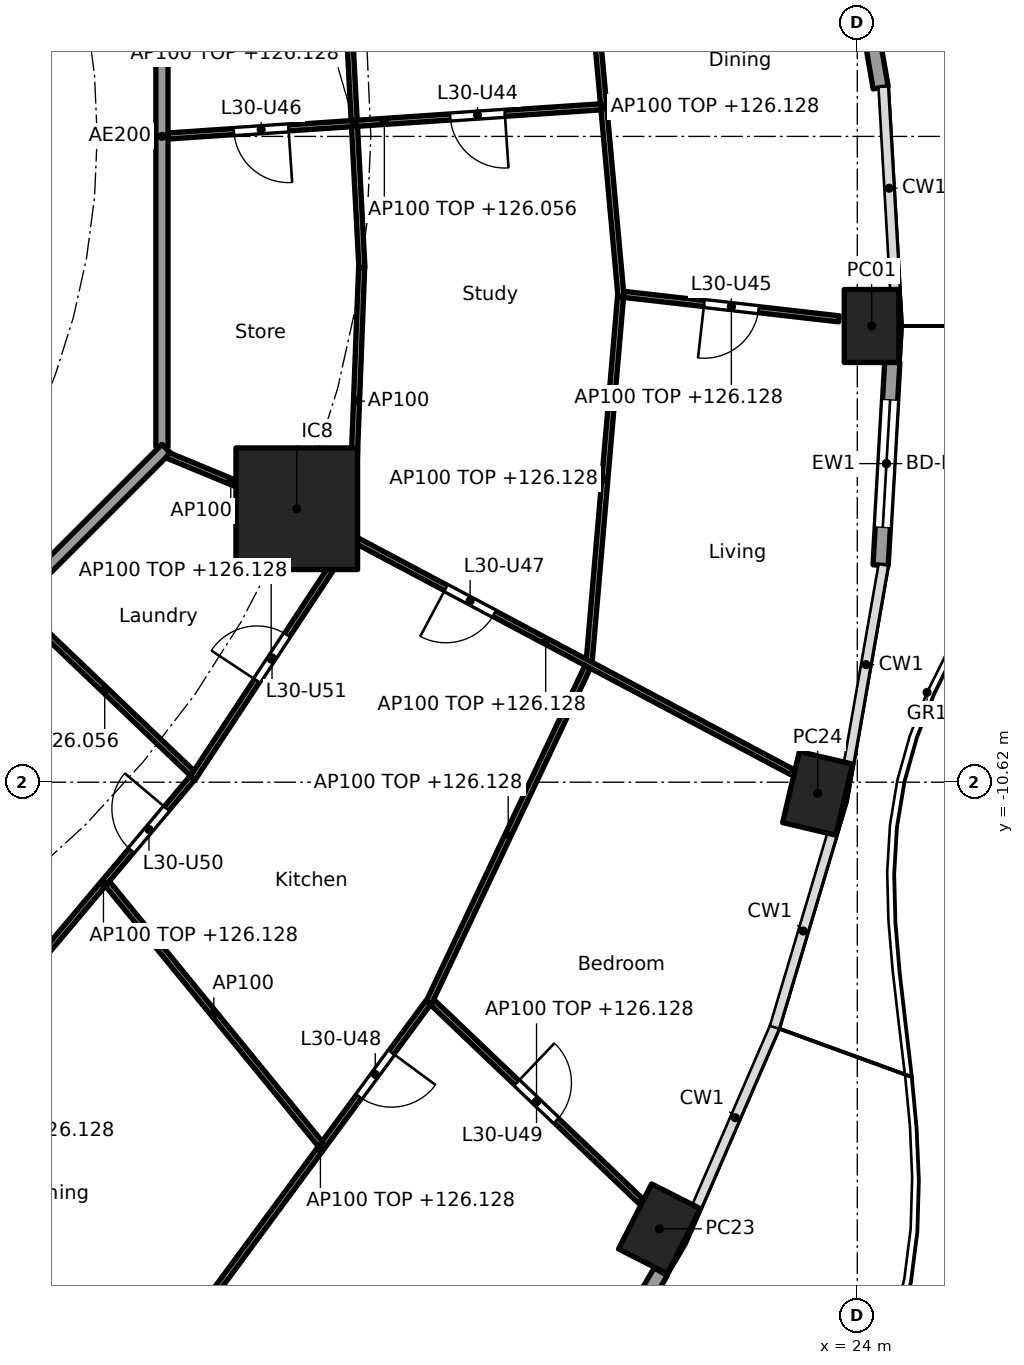
"""IFC4 building model, lengths in metres.
Left out: names, types, materials, properties, quantities, classifications, styles, units other than length and angle.
Written with IfcOpenShell. Run it as: python <this file> out.ifc"""

import sys

from ifc_helpers import new_model, si_unit, direction, frame, frame_2d, origin, origin_2d, place, context, subcontext, project, spatial, rectangle, hollow_rectangle, extrude, element, fill, save


model = new_model("IFC4")
c1 = context("Model", 3, precision=1e-05, world=origin(), true_north=direction((0.0, 1.0)))
c2 = subcontext(c1, "Body", "Model", "MODEL_VIEW")
j1 = project(units=[si_unit("LENGTHUNIT", "METRE"), si_unit("PLANEANGLEUNIT", "RADIAN")], contexts=[c1])
p1 = place(None, origin())
s1 = spatial("IfcSite", under=j1, at=p1, CompositionType="ELEMENT")
p2 = place(p1, origin())
s2 = spatial("IfcBuilding", under=s1, at=p2, CompositionType="ELEMENT")
p3 = place(p2, frame((0.0, 0.0, 123.3)))
s3 = spatial("IfcBuildingStorey", under=s2, at=p3, CompositionType="ELEMENT", Elevation=123.3)
for number, where, z_axis, x_axis in (
    (1, (24.235, -3.118, 0.0), (0.0, 0.0, 1.0), (0.0, 1.0, 0.0)),
    (2, (20.747, -17.965, 0.0), (0.0, 0.0, 1.0), (0.452, 0.892, 0.0)),
    (3, (23.348, -10.803, 0.0), (0.0, 0.0, 1.0), (0.229, 0.973, 0.0)),
):
    element("IfcColumn", number, at=place(p3, frame(where, z_axis=z_axis, x_axis=x_axis)), inside=s3, PredefinedType="COLUMN", context=c2, shape_type="SweptSolid", body=[
        extrude(hollow_rectangle(XDim=1.2, YDim=0.9, WallThickness=0.04, at=origin_2d()), origin(), (0.0, 0.0, 1.0), 3.7),
    ])
p4 = place(p3, frame((14.782, -6.123, 0.0), z_axis=(0.0, 0.0, 1.0), x_axis=(1.0, 0.0, 0.0)))
e4 = element("IfcColumn", 4, at=p4, inside=s3, PredefinedType="COLUMN", context=c2, shape_type="SweptSolid", body=[
    extrude(rectangle(XDim=2.0, YDim=2.0, at=origin_2d()), origin(), (0.0, 0.0, 1.0), 3.7),
])
p5 = place(p3, frame((23.811, 4.085, 0.0), z_axis=(0.0, 0.0, 1.0), x_axis=(0.172163521006, -0.985068384446, 0.0)))
e5 = element("IfcWall", 5, at=p5, inside=s3, PredefinedType="SOLIDWALL", context=c2, shape_type="SweptSolid", body=[
    extrude(rectangle(XDim=3.333, YDim=0.25, at=frame_2d((1.666, 0.0))), origin(), (0.0, 0.0, 1.0), 3.44),
])
p6 = place(p5, frame((0.616, 0.0, 0.0)))
e6 = element("IfcOpeningElement", 6, at=p6, cuts=e5, PredefinedType="OPENING", context=c2, shape_type="SweptSolid", body=[
    extrude(rectangle(XDim=2.1, YDim=2.4, at=frame_2d((1.05, 1.2))), frame((0.0, 0.135, 0.0), z_axis=(0.0, -1.0, 0.0), x_axis=(1.0, 0.0, 0.0)), (0.0, 0.0, 1.0), 0.27),
])
p7 = place(p3, frame((20.768, -18.669, 0.0), z_axis=(0.0, 0.0, 1.0), x_axis=(-0.506314982873, -0.862348617508, 0.0)))
e7 = element("IfcWall", 7, at=p7, inside=s3, PredefinedType="SOLIDWALL", context=c2, shape_type="SweptSolid", body=[
    extrude(rectangle(XDim=3.208, YDim=0.25, at=frame_2d((1.604, 0.0))), origin(), (0.0, 0.0, 1.0), 3.44),
])
p8 = place(p7, frame((0.554, 0.0, 0.0)))
e8 = element("IfcOpeningElement", 8, at=p8, cuts=e7, PredefinedType="OPENING", context=c2, shape_type="SweptSolid", body=[
    extrude(rectangle(XDim=2.1, YDim=2.4, at=frame_2d((1.05, 1.2))), frame((0.0, 0.135, 0.0), z_axis=(0.0, -1.0, 0.0), x_axis=(1.0, 0.0, 0.0)), (0.0, 0.0, 1.0), 0.27),
])
p9 = place(p3, frame((24.576, -3.709, 0.0), z_axis=(0.0, 0.0, 1.0), x_axis=(-0.05746514539, -0.998347513176, 0.0)))
e9 = element("IfcWall", 9, at=p9, inside=s3, PredefinedType="SOLIDWALL", context=c2, shape_type="SweptSolid", body=[
    extrude(rectangle(XDim=3.348, YDim=0.25, at=frame_2d((1.674, 0.0))), origin(), (0.0, 0.0, 1.0), 3.44),
])
p10 = place(p9, frame((0.624, 0.0, 0.0)))
e10 = element("IfcOpeningElement", 10, at=p10, cuts=e9, PredefinedType="OPENING", context=c2, shape_type="SweptSolid", body=[
    extrude(rectangle(XDim=2.1, YDim=2.4, at=frame_2d((1.05, 1.2))), frame((0.0, 0.135, 0.0), z_axis=(0.0, -1.0, 0.0), x_axis=(1.0, 0.0, 0.0)), (0.0, 0.0, 1.0), 0.27),
])
p11 = place(p3, frame((6.14, -14.829, 0.0), z_axis=(0.0, 0.0, 1.0), x_axis=(0.346169582481, -0.938171956608, 0.0)))
e11 = element("IfcWall", 11, at=p11, inside=s3, PredefinedType="PARTITIONING", context=c2, shape_type="SweptSolid", body=[
    extrude(rectangle(XDim=14.354, YDim=0.2, at=frame_2d((7.177, 0.0))), origin(), (0.0, 0.0, 1.0), 2.828),
])
p12 = place(p3, frame((12.565, -5.104, 0.0), z_axis=(0.0, 0.0, 1.0), x_axis=(0.0, 1.0, 0.0)))
e12 = element("IfcWall", 12, at=p12, inside=s3, PredefinedType="PARTITIONING", context=c2, shape_type="SweptSolid", body=[
    extrude(rectangle(XDim=10.209, YDim=0.2, at=frame_2d((5.104, 0.0))), origin(), (0.0, 0.0, 1.0), 3.44),
])
p13 = place(p3, frame((5.275, -12.494, 0.0), z_axis=(0.0, 0.0, 1.0), x_axis=(0.707106781187, 0.707106781187, 0.0)))
e13 = element("IfcWall", 13, at=p13, inside=s3, PredefinedType="PARTITIONING", context=c2, shape_type="SweptSolid", body=[
    extrude(rectangle(XDim=10.409, YDim=0.2, at=frame_2d((5.205, 0.0))), origin(), (0.0, 0.0, 1.0), 3.44),
])
p14 = place(p3, frame((15.853, -2.158, 0.0), z_axis=(0.0, 0.0, 1.0), x_axis=(-0.052483289253, 0.99862180246, 0.0)))
e14 = element("IfcWall", 14, at=p14, inside=s3, PredefinedType="PARTITIONING", context=c2, shape_type="SweptSolid", body=[
    extrude(rectangle(XDim=4.75, YDim=0.1, at=frame_2d((2.375, 0.0))), origin(), (0.0, 0.0, 1.0), 2.828),
])
p15 = place(p3, frame((15.849, -2.158, 0.0), z_axis=(0.0, 0.0, 1.0), x_axis=(-0.038390448414, -0.999262815014, 0.0)))
e15 = element("IfcWall", 15, at=p15, inside=s3, PredefinedType="PARTITIONING", context=c2, shape_type="SweptSolid", body=[
    extrude(rectangle(XDim=4.394, YDim=0.1, at=frame_2d((2.197, 0.0))), origin(), (0.0, 0.0, 1.0), 3.44),
])
p16 = place(p3, frame((20.16, -2.598, 0.0), z_axis=(0.0, 0.0, 1.0), x_axis=(0.993610673305, -0.112861994911, 0.0)))
e16 = element("IfcWall", 16, at=p16, inside=s3, PredefinedType="PARTITIONING", context=c2, shape_type="SweptSolid", body=[
    extrude(rectangle(XDim=3.561, YDim=0.1, at=frame_2d((1.78, 0.0))), origin(), (0.0, 0.0, 1.0), 2.828),
])
p17 = place(p16, frame((1.33, 0.0, 0.0)))
e17 = element("IfcOpeningElement", 17, at=p17, cuts=e16, PredefinedType="OPENING", context=c2, shape_type="SweptSolid", body=[
    extrude(rectangle(XDim=0.9, YDim=2.1, at=frame_2d((0.45, 1.05))), frame((0.0, 0.06, 0.0), z_axis=(0.0, -1.0, 0.0), x_axis=(1.0, 0.0, 0.0)), (0.0, 0.0, 1.0), 0.12),
])
p18 = place(p3, frame((20.115, -2.642, 0.0), z_axis=(0.0, 0.0, 1.0), x_axis=(-0.090563746294, 0.995890660593, 0.0)))
e18 = element("IfcWall", 18, at=p18, inside=s3, PredefinedType="PARTITIONING", context=c2, shape_type="SweptSolid", body=[
    extrude(rectangle(XDim=6.289, YDim=0.1, at=frame_2d((3.145, 0.0))), origin(), (0.0, 0.0, 1.0), 2.828),
])
p19 = place(p18, frame((4.242, 0.0, 0.0)))
e19 = element("IfcOpeningElement", 19, at=p19, cuts=e18, PredefinedType="OPENING", context=c2, shape_type="SweptSolid", body=[
    extrude(rectangle(XDim=0.9, YDim=2.1, at=frame_2d((0.45, 1.05))), frame((0.0, 0.06, 0.0), z_axis=(0.0, -1.0, 0.0), x_axis=(1.0, 0.0, 0.0)), (0.0, 0.0, 1.0), 0.12),
])
p20 = place(p3, frame((20.106, -2.642, 0.0), z_axis=(0.0, 0.0, 1.0), x_axis=(-0.085672025822, -0.996323393277, 0.0)))
e20 = element("IfcWall", 20, at=p20, inside=s3, PredefinedType="PARTITIONING", context=c2, shape_type="SweptSolid", body=[
    extrude(rectangle(XDim=6.007, YDim=0.1, at=frame_2d((3.003, 0.0))), origin(), (0.0, 0.0, 1.0), 2.828),
])
p21 = place(p3, frame((12.665, 0.007, 0.0), z_axis=(0.0, 0.0, 1.0), x_axis=(0.997737186236, 0.067234717233, 0.0)))
e21 = element("IfcWall", 21, at=p21, inside=s3, PredefinedType="PARTITIONING", context=c2, shape_type="SweptSolid", body=[
    extrude(rectangle(XDim=7.132, YDim=0.1, at=frame_2d((3.566, 0.0))), origin(), (0.0, 0.0, 1.0), 2.756),
])
p22 = place(p21, frame((4.651, 0.0, 0.0)))
e22 = element("IfcOpeningElement", 22, at=p22, cuts=e21, PredefinedType="OPENING", context=c2, shape_type="SweptSolid", body=[
    extrude(rectangle(XDim=0.9, YDim=2.1, at=frame_2d((0.45, 1.05))), frame((0.0, 0.06, 0.0), z_axis=(0.0, -1.0, 0.0), x_axis=(1.0, 0.0, 0.0)), (0.0, 0.0, 1.0), 0.12),
])
p23 = place(p21, frame((1.085, 0.0, 0.0)))
e23 = element("IfcOpeningElement", 23, at=p23, cuts=e21, PredefinedType="OPENING", context=c2, shape_type="SweptSolid", body=[
    extrude(rectangle(XDim=0.9, YDim=2.1, at=frame_2d((0.45, 1.05))), frame((0.0, 0.06, 0.0), z_axis=(0.0, -1.0, 0.0), x_axis=(1.0, 0.0, 0.0)), (0.0, 0.0, 1.0), 0.12),
])
p24 = place(p3, frame((10.138, -14.026, 0.0), z_axis=(0.0, 0.0, 1.0), x_axis=(0.644051444483, 0.764982180746, 0.0)))
e24 = element("IfcWall", 24, at=p24, inside=s3, PredefinedType="PARTITIONING", context=c2, shape_type="SweptSolid", body=[
    extrude(rectangle(XDim=4.548, YDim=0.1, at=frame_2d((2.274, 0.0))), origin(), (0.0, 0.0, 1.0), 2.828),
])
p25 = place(p24, frame((2.986, 0.0, 0.0)))
e25 = element("IfcOpeningElement", 25, at=p25, cuts=e24, PredefinedType="OPENING", context=c2, shape_type="SweptSolid", body=[
    extrude(rectangle(XDim=0.9, YDim=2.1, at=frame_2d((0.45, 1.05))), frame((0.0, 0.06, 0.0), z_axis=(0.0, -1.0, 0.0), x_axis=(1.0, 0.0, 0.0)), (0.0, 0.0, 1.0), 0.12),
])
p26 = place(p3, frame((13.397, -19.053, 0.0), z_axis=(0.0, 0.0, 1.0), x_axis=(0.593522299069, 0.804817544856, 0.0)))
e26 = element("IfcWall", 26, at=p26, inside=s3, PredefinedType="PARTITIONING", context=c2, shape_type="SweptSolid", body=[
    extrude(rectangle(XDim=5.976, YDim=0.1, at=frame_2d((2.988, 0.0))), origin(), (0.0, 0.0, 1.0), 2.828),
])
p27 = place(p26, frame((4.057, 0.0, 0.0)))
e27 = element("IfcOpeningElement", 27, at=p27, cuts=e26, PredefinedType="OPENING", context=c2, shape_type="SweptSolid", body=[
    extrude(rectangle(XDim=0.9, YDim=2.1, at=frame_2d((0.45, 1.05))), frame((0.0, 0.06, 0.0), z_axis=(0.0, -1.0, 0.0), x_axis=(1.0, 0.0, 0.0)), (0.0, 0.0, 1.0), 0.12),
])
p28 = place(p3, frame((11.667, -12.287, 0.0), z_axis=(0.0, 0.0, 1.0), x_axis=(0.633038312428, -0.774120465431, 0.0)))
e28 = element("IfcWall", 28, at=p28, inside=s3, PredefinedType="PARTITIONING", context=c2, shape_type="SweptSolid", body=[
    extrude(rectangle(XDim=5.532, YDim=0.1, at=frame_2d((2.766, 0.0))), origin(), (0.0, 0.0, 1.0), 3.44),
])
p29 = place(p3, frame((10.184, -7.727, 0.0), z_axis=(0.0, 0.0, 1.0), x_axis=(0.723654892782, -0.690162007179, 0.0)))
e29 = element("IfcWall", 29, at=p29, inside=s3, PredefinedType="PARTITIONING", context=c2, shape_type="SweptSolid", body=[
    extrude(rectangle(XDim=3.98, YDim=0.1, at=frame_2d((1.99, 0.0))), origin(), (0.0, 0.0, 1.0), 2.756),
])
p30 = place(p3, frame((13.072, -10.55, 0.0), z_axis=(0.0, 0.0, 1.0), x_axis=(0.550614843759, 0.834759422727, 0.0)))
e30 = element("IfcWall", 30, at=p30, inside=s3, PredefinedType="PARTITIONING", context=c2, shape_type="SweptSolid", body=[
    extrude(rectangle(XDim=4.683, YDim=0.1, at=frame_2d((2.341, 0.0))), origin(), (0.0, 0.0, 1.0), 2.828),
])
p31 = place(p30, frame((1.917, 0.0, 0.0)))
e31 = element("IfcOpeningElement", 31, at=p31, cuts=e30, PredefinedType="OPENING", context=c2, shape_type="SweptSolid", body=[
    extrude(rectangle(XDim=0.9, YDim=2.1, at=frame_2d((0.45, 1.05))), frame((0.0, 0.06, 0.0), z_axis=(0.0, -1.0, 0.0), x_axis=(1.0, 0.0, 0.0)), (0.0, 0.0, 1.0), 0.12),
])
p32 = place(p3, frame((17.01, -14.238, 0.0), z_axis=(0.0, 0.0, 1.0), x_axis=(0.723650186498, -0.690166941821, 0.0)))
e32 = element("IfcWall", 32, at=p32, inside=s3, PredefinedType="PARTITIONING", context=c2, shape_type="SweptSolid", body=[
    extrude(rectangle(XDim=4.74, YDim=0.1, at=frame_2d((2.37, 0.0))), origin(), (0.0, 0.0, 1.0), 2.828),
])
p33 = place(p32, frame((1.92, 0.0, 0.0)))
e33 = element("IfcOpeningElement", 33, at=p33, cuts=e32, PredefinedType="OPENING", context=c2, shape_type="SweptSolid", body=[
    extrude(rectangle(XDim=0.9, YDim=2.1, at=frame_2d((0.45, 1.05))), frame((0.0, 0.06, 0.0), z_axis=(0.0, -1.0, 0.0), x_axis=(1.0, 0.0, 0.0)), (0.0, 0.0, 1.0), 0.12),
])
p34 = place(p3, frame((16.953, -14.249, 0.0), z_axis=(0.0, 0.0, 1.0), x_axis=(0.427456178439, 0.904036069808, 0.0)))
e34 = element("IfcWall", 34, at=p34, inside=s3, PredefinedType="PARTITIONING", context=c2, shape_type="SweptSolid", body=[
    extrude(rectangle(XDim=6.113, YDim=0.1, at=frame_2d((3.057, 0.0))), origin(), (0.0, 0.0, 1.0), 2.828),
])
p35 = place(p3, frame((12.657, -5.243, 0.0), z_axis=(0.0, 0.0, 1.0), x_axis=(0.923864733477, -0.382719158442, 0.0)))
e35 = element("IfcWall", 35, at=p35, inside=s3, PredefinedType="PARTITIONING", context=c2, shape_type="SweptSolid", body=[
    extrude(rectangle(XDim=2.25, YDim=0.1, at=frame_2d((1.125, 0.0))), origin(), (0.0, 0.0, 1.0), 3.44),
])
p36 = place(p3, frame((14.826, -6.146, 0.0), z_axis=(0.0, 0.0, 1.0), x_axis=(0.883012998471, -0.469348532044, 0.0)))
e36 = element("IfcWall", 36, at=p36, inside=s3, PredefinedType="PARTITIONING", context=c2, shape_type="SweptSolid", body=[
    extrude(rectangle(XDim=9.172, YDim=0.1, at=frame_2d((4.586, 0.0))), origin(), (0.0, 0.0, 1.0), 2.828),
])
p37 = place(p36, frame((2.728, 0.0, 0.0)))
e37 = element("IfcOpeningElement", 37, at=p37, cuts=e36, PredefinedType="OPENING", context=c2, shape_type="SweptSolid", body=[
    extrude(rectangle(XDim=0.9, YDim=2.1, at=frame_2d((0.45, 1.05))), frame((0.0, 0.06, 0.0), z_axis=(0.0, -1.0, 0.0), x_axis=(1.0, 0.0, 0.0)), (0.0, 0.0, 1.0), 0.12),
])
p38 = place(p10, origin())
e38 = element("IfcDoor", 38, at=p38, inside=s3, OperationType="SLIDING_TO_LEFT", PredefinedType="DOOR", context=c2, shape_type="SweptSolid", body=[
    extrude(rectangle(XDim=2.1, YDim=2.4, at=frame_2d((1.05, 1.2))), frame((0.0, 0.025, 0.0), z_axis=(0.0, -1.0, 0.0), x_axis=(1.0, 0.0, 0.0)), (0.0, 0.0, 1.0), 0.05),
])
fill(e10, e38)
p39 = place(p22, frame((0.9, 0.0, 0.0), x_axis=(-1.0, 0.0, 0.0)))
e39 = element("IfcDoor", 39, at=p39, inside=s3, OperationType="SINGLE_SWING_LEFT", PredefinedType="DOOR", context=c2, shape_type="SweptSolid", body=[
    extrude(rectangle(XDim=0.9, YDim=2.1, at=frame_2d((0.45, 1.05))), frame((0.0, 0.025, 0.0), z_axis=(0.0, -1.0, 0.0), x_axis=(1.0, 0.0, 0.0)), (0.0, 0.0, 1.0), 0.05),
])
fill(e22, e39)
p40 = place(p17, frame((0.9, 0.0, 0.0), x_axis=(-1.0, 0.0, 0.0)))
e40 = element("IfcDoor", 40, at=p40, inside=s3, OperationType="SINGLE_SWING_RIGHT", PredefinedType="DOOR", context=c2, shape_type="SweptSolid", body=[
    extrude(rectangle(XDim=0.9, YDim=2.1, at=frame_2d((0.45, 1.05))), frame((0.0, 0.025, 0.0), z_axis=(0.0, -1.0, 0.0), x_axis=(1.0, 0.0, 0.0)), (0.0, 0.0, 1.0), 0.05),
])
fill(e17, e40)
p41 = place(p23, frame((0.9, 0.0, 0.0), x_axis=(-1.0, 0.0, 0.0)))
e41 = element("IfcDoor", 41, at=p41, inside=s3, OperationType="SINGLE_SWING_LEFT", PredefinedType="DOOR", context=c2, shape_type="SweptSolid", body=[
    extrude(rectangle(XDim=0.9, YDim=2.1, at=frame_2d((0.45, 1.05))), frame((0.0, 0.025, 0.0), z_axis=(0.0, -1.0, 0.0), x_axis=(1.0, 0.0, 0.0)), (0.0, 0.0, 1.0), 0.05),
])
fill(e23, e41)
p42 = place(p37, frame((0.9, 0.0, 0.0), x_axis=(-1.0, 0.0, 0.0)))
e42 = element("IfcDoor", 42, at=p42, inside=s3, OperationType="SINGLE_SWING_RIGHT", PredefinedType="DOOR", context=c2, shape_type="SweptSolid", body=[
    extrude(rectangle(XDim=0.9, YDim=2.1, at=frame_2d((0.45, 1.05))), frame((0.0, 0.025, 0.0), z_axis=(0.0, -1.0, 0.0), x_axis=(1.0, 0.0, 0.0)), (0.0, 0.0, 1.0), 0.05),
])
fill(e37, e42)
p43 = place(p27, frame((0.9, 0.0, 0.0), x_axis=(-1.0, 0.0, 0.0)))
e43 = element("IfcDoor", 43, at=p43, inside=s3, OperationType="SINGLE_SWING_LEFT", PredefinedType="DOOR", context=c2, shape_type="SweptSolid", body=[
    extrude(rectangle(XDim=0.9, YDim=2.1, at=frame_2d((0.45, 1.05))), frame((0.0, 0.025, 0.0), z_axis=(0.0, -1.0, 0.0), x_axis=(1.0, 0.0, 0.0)), (0.0, 0.0, 1.0), 0.05),
])
fill(e27, e43)
p44 = place(p33, origin())
e44 = element("IfcDoor", 44, at=p44, inside=s3, OperationType="SINGLE_SWING_LEFT", PredefinedType="DOOR", context=c2, shape_type="SweptSolid", body=[
    extrude(rectangle(XDim=0.9, YDim=2.1, at=frame_2d((0.45, 1.05))), frame((0.0, 0.025, 0.0), z_axis=(0.0, -1.0, 0.0), x_axis=(1.0, 0.0, 0.0)), (0.0, 0.0, 1.0), 0.05),
])
fill(e33, e44)
p45 = place(p25, origin())
e45 = element("IfcDoor", 45, at=p45, inside=s3, OperationType="SINGLE_SWING_RIGHT", PredefinedType="DOOR", context=c2, shape_type="SweptSolid", body=[
    extrude(rectangle(XDim=0.9, YDim=2.1, at=frame_2d((0.45, 1.05))), frame((0.0, 0.025, 0.0), z_axis=(0.0, -1.0, 0.0), x_axis=(1.0, 0.0, 0.0)), (0.0, 0.0, 1.0), 0.05),
])
fill(e25, e45)
p46 = place(p31, origin())
e46 = element("IfcDoor", 46, at=p46, inside=s3, OperationType="SINGLE_SWING_LEFT", PredefinedType="DOOR", context=c2, shape_type="SweptSolid", body=[
    extrude(rectangle(XDim=0.9, YDim=2.1, at=frame_2d((0.45, 1.05))), frame((0.0, 0.025, 0.0), z_axis=(0.0, -1.0, 0.0), x_axis=(1.0, 0.0, 0.0)), (0.0, 0.0, 1.0), 0.05),
])
fill(e31, e46)
save(model, sys.argv[1])
